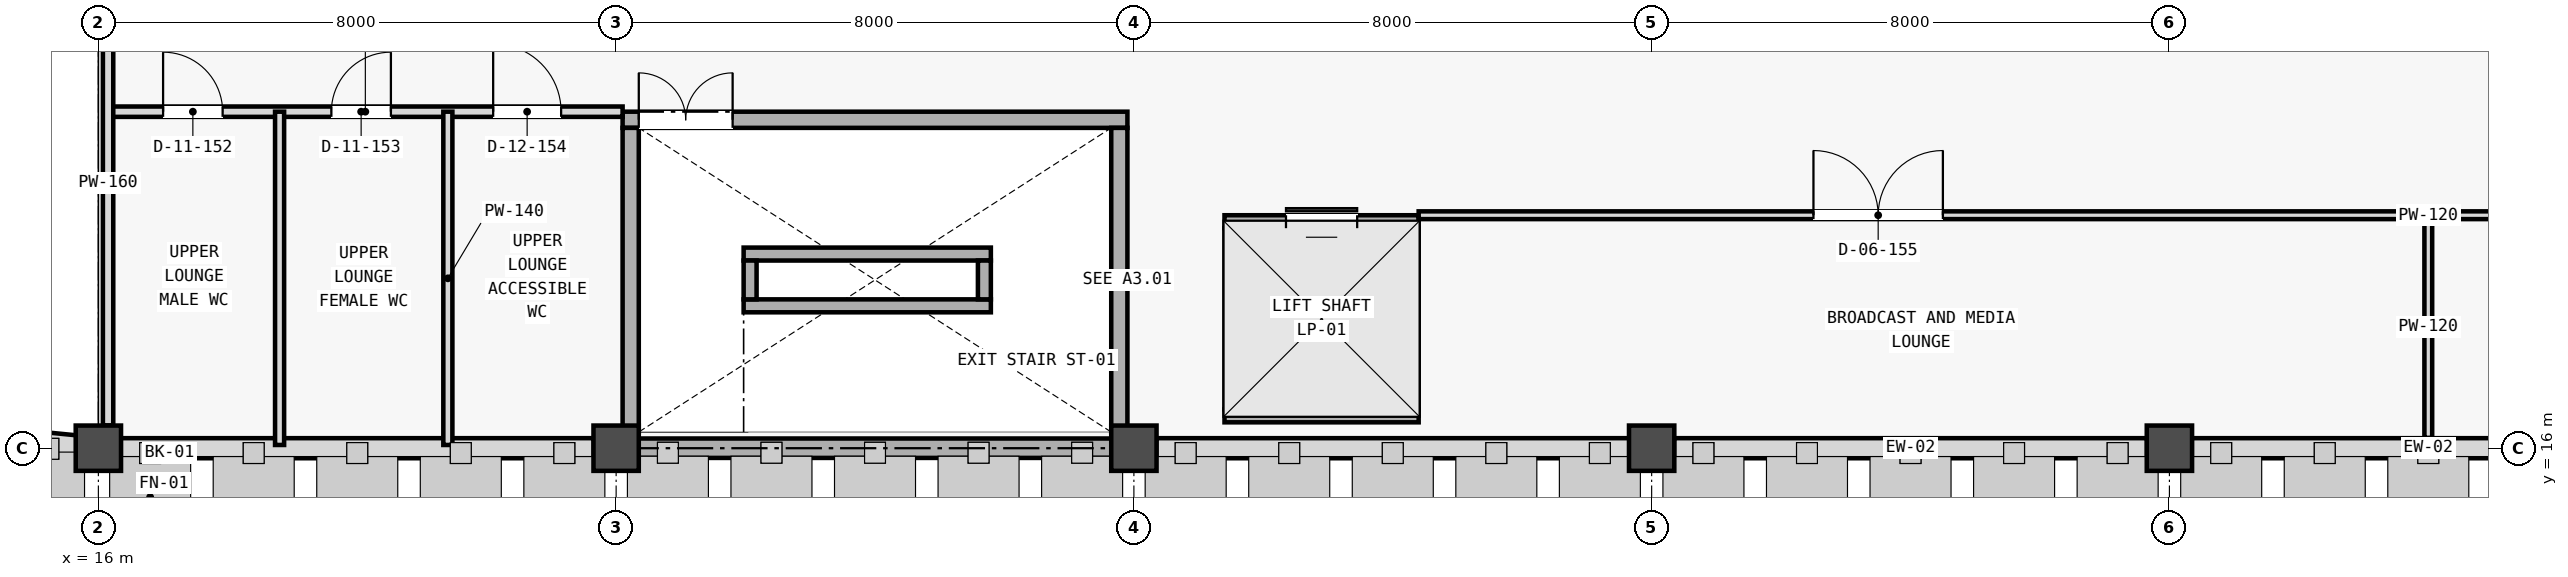
"""IFC4 building model, lengths in metres.
Left out: names, types, materials, properties, quantities, classifications, styles, units other than length and angle.
Written with IfcOpenShell. Run it as: python <this file> out.ifc"""

import sys

from ifc_helpers import new_model, si_unit, direction, frame, frame_2d, origin, origin_2d, place, context, subcontext, project, spatial, rectangle, extrude, element, fill, save


model = new_model("IFC4")
c1 = context("Model", 3, precision=1e-05, world=origin(), true_north=direction((0.0, 1.0)))
c2 = subcontext(c1, "Body", "Model", "MODEL_VIEW")
j1 = project(units=[si_unit("LENGTHUNIT", "METRE"), si_unit("PLANEANGLEUNIT", "RADIAN")], contexts=[c1])
p1 = place(None, origin())
s1 = spatial("IfcSite", under=j1, at=p1, CompositionType="ELEMENT")
p2 = place(p1, origin())
s2 = spatial("IfcBuilding", under=s1, at=p2, CompositionType="ELEMENT")
p3 = place(p2, frame((0.0, 0.0, 10.2)))
s3 = spatial("IfcBuildingStorey", under=s2, at=p3, CompositionType="ELEMENT", Elevation=10.2)
p4 = place(p3, frame((16.0, 16.0, 0.0), z_axis=(0.0, 0.0, 1.0), x_axis=(1.0, 0.0, 0.0)))
e1 = element("IfcColumn", 1, at=p4, inside=s3, PredefinedType="COLUMN", context=c2, shape_type="SweptSolid", body=[
    extrude(rectangle(XDim=0.7, YDim=0.7, at=origin_2d()), origin(), (0.0, 0.0, 1.0), 6.625),
])
p5 = place(p3, frame((24.0, 16.0, 0.0), z_axis=(0.0, 0.0, 1.0), x_axis=(1.0, 0.0, 0.0)))
e2 = element("IfcColumn", 2, at=p5, inside=s3, PredefinedType="COLUMN", context=c2, shape_type="SweptSolid", body=[
    extrude(rectangle(XDim=0.7, YDim=0.7, at=origin_2d()), origin(), (0.0, 0.0, 1.0), 7.325),
])
p6 = place(p3, frame((32.0, 16.0, 0.0), z_axis=(0.0, 0.0, 1.0), x_axis=(1.0, 0.0, 0.0)))
e3 = element("IfcColumn", 3, at=p6, inside=s3, PredefinedType="COLUMN", context=c2, shape_type="SweptSolid", body=[
    extrude(rectangle(XDim=0.7, YDim=0.7, at=origin_2d()), origin(), (0.0, 0.0, 1.0), 7.825),
])
p7 = place(p3, frame((40.0, 16.0, 0.0), z_axis=(0.0, 0.0, 1.0), x_axis=(1.0, 0.0, 0.0)))
e4 = element("IfcColumn", 4, at=p7, inside=s3, PredefinedType="COLUMN", context=c2, shape_type="SweptSolid", body=[
    extrude(rectangle(XDim=0.7, YDim=0.7, at=origin_2d()), origin(), (0.0, 0.0, 1.0), 8.125),
])
p8 = place(p3, frame((48.0, 16.0, 0.0), z_axis=(0.0, 0.0, 1.0), x_axis=(1.0, 0.0, 0.0)))
e5 = element("IfcColumn", 5, at=p8, inside=s3, PredefinedType="COLUMN", context=c2, shape_type="SweptSolid", body=[
    extrude(rectangle(XDim=0.7, YDim=0.7, at=origin_2d()), origin(), (0.0, 0.0, 1.0), 8.225),
])
p9 = place(p3, frame((16.346, 16.0, 0.0), z_axis=(0.0, 0.0, 1.0), x_axis=(1.0, 0.0, 0.0)))
e6 = element("IfcWall", 6, at=p9, inside=s3, PredefinedType="STANDARD", context=c2, shape_type="SweptSolid", body=[
    extrude(rectangle(XDim=7.308, YDim=0.31, at=frame_2d((3.654, 0.0))), origin(), (0.0, 0.0, 1.0), 3.39),
])
p10 = place(p3, frame((24.346, 16.0, 0.0), z_axis=(0.0, 0.0, 1.0), x_axis=(1.0, 0.0, 0.0)))
e7 = element("IfcWall", 7, at=p10, inside=s3, PredefinedType="SHEAR", context=c2, shape_type="SweptSolid", body=[
    extrude(rectangle(XDim=7.308, YDim=0.3, at=frame_2d((3.654, 0.0))), origin(), (0.0, 0.0, 1.0), 4.2),
])
for number, where, z_axis, x_axis in (
    (8, (32.346, 16.0, 0.0), (0.0, 0.0, 1.0), (1.0, 0.0, 0.0)),
    (9, (40.346, 16.0, 0.0), (0.0, 0.0, 1.0), (1.0, 0.0, 0.0)),
    (10, (48.346, 16.0, 0.0), (0.0, 0.0, 1.0), (1.0, 0.0, 0.0)),
):
    element("IfcWall", number, at=place(p3, frame(where, z_axis=z_axis, x_axis=x_axis)), inside=s3, PredefinedType="STANDARD", context=c2, shape_type="SweptSolid", body=[
        extrude(rectangle(XDim=7.308, YDim=0.31, at=frame_2d((3.654, 0.0))), origin(), (0.0, 0.0, 1.0), 3.39),
    ])
p11 = place(p3, frame((12.879, 16.307, 0.0), z_axis=(0.0, 0.0, 1.0), x_axis=(0.995186340733, -0.098000751113, 0.0)))
e11 = element("IfcWall", 11, at=p11, inside=s3, PredefinedType="STANDARD", context=c2, shape_type="SweptSolid", body=[
    extrude(rectangle(XDim=3.136, YDim=0.33, at=frame_2d((1.568, 0.0))), origin(), (0.0, 0.0, 1.0), 3.63),
])
p12 = place(p11, frame((0.968, 0.0, 1.05)))
e12 = element("IfcOpeningElement", 12, at=p12, cuts=e11, PredefinedType="OPENING", context=c2, shape_type="SweptSolid", body=[
    extrude(rectangle(XDim=1.2, YDim=2.05, at=frame_2d((0.6, 1.025))), frame((0.0, 0.175, 0.0), z_axis=(0.0, -1.0, 0.0), x_axis=(1.0, 0.0, 0.0)), (0.0, 0.0, 1.0), 0.35),
])
p13 = place(p3, frame((24.1, 21.075, 0.0), z_axis=(0.0, 0.0, 1.0), x_axis=(1.0, 0.0, 0.0)))
e13 = element("IfcWall", 13, at=p13, inside=s3, PredefinedType="SHEAR", context=c2, shape_type="SweptSolid", body=[
    extrude(rectangle(XDim=7.8, YDim=0.25, at=frame_2d((3.9, 0.0))), origin(), (0.0, 0.0, 1.0), 3.96),
])
p14 = place(p13, frame((0.25, 0.0, 0.0)))
e14 = element("IfcOpeningElement", 14, at=p14, cuts=e13, PredefinedType="OPENING", context=c2, shape_type="SweptSolid", body=[
    extrude(rectangle(XDim=1.45, YDim=2.2, at=frame_2d((0.725, 1.1))), frame((0.0, 0.135, 0.0), z_axis=(0.0, -1.0, 0.0), x_axis=(1.0, 0.0, 0.0)), (0.0, 0.0, 1.0), 0.27),
])
for number, where, z_axis, x_axis in (
    (15, (24.225, 16.25, 0.0), (0.0, 0.0, 1.0), (0.0, 1.0, 0.0)),
    (16, (31.775, 16.25, 0.0), (0.0, 0.0, 1.0), (0.0, 1.0, 0.0)),
):
    element("IfcWall", number, at=place(p3, frame(where, z_axis=z_axis, x_axis=x_axis)), inside=s3, PredefinedType="SHEAR", context=c2, shape_type="SweptSolid", body=[
        extrude(rectangle(XDim=4.7, YDim=0.25, at=frame_2d((2.35, 0.0))), origin(), (0.0, 0.0, 1.0), 3.96),
    ])
for number, where, z_axis, x_axis in (
    (17, (25.97, 18.2, 0.0), (0.0, 0.0, 1.0), (1.0, 0.0, 0.0)),
    (18, (25.97, 19.0, 0.0), (0.0, 0.0, 1.0), (1.0, 0.0, 0.0)),
):
    element("IfcWall", number, at=place(p3, frame(where, z_axis=z_axis, x_axis=x_axis)), inside=s3, PredefinedType="SHEAR", context=c2, shape_type="SweptSolid", body=[
        extrude(rectangle(XDim=3.82, YDim=0.2, at=frame_2d((1.91, 0.0))), origin(), (0.0, 0.0, 1.0), 3.96),
    ])
for number, where, z_axis, x_axis in (
    (19, (26.07, 18.3, 0.0), (0.0, 0.0, 1.0), (0.0, 1.0, 0.0)),
    (20, (29.69, 18.3, 0.0), (0.0, 0.0, 1.0), (0.0, 1.0, 0.0)),
):
    element("IfcWall", number, at=place(p3, frame(where, z_axis=z_axis, x_axis=x_axis)), inside=s3, PredefinedType="SHEAR", context=c2, shape_type="SweptSolid", body=[
        extrude(rectangle(XDim=0.6, YDim=0.2, at=frame_2d((0.3, 0.0))), origin(), (0.0, 0.0, 1.0), 3.96),
    ])
p15 = place(p3, frame((33.4, 16.5, 0.0), z_axis=(0.0, 0.0, 1.0), x_axis=(1.0, 0.0, 0.0)))
e21 = element("IfcWall", 21, at=p15, inside=s3, PredefinedType="SHEAR", context=c2, shape_type="SweptSolid", body=[
    extrude(rectangle(XDim=3.0, YDim=0.2, at=frame_2d((1.5, 0.0))), origin(), (0.0, 0.0, 1.0), 3.96),
])
p16 = place(p3, frame((33.4, 19.5, 0.0), z_axis=(0.0, 0.0, 1.0), x_axis=(1.0, 0.0, 0.0)))
e22 = element("IfcWall", 22, at=p16, inside=s3, PredefinedType="SHEAR", context=c2, shape_type="SweptSolid", body=[
    extrude(rectangle(XDim=3.0, YDim=0.2, at=frame_2d((1.5, 0.0))), origin(), (0.0, 0.0, 1.0), 3.96),
])
p17 = place(p16, frame((0.95, 0.0, 0.0)))
e23 = element("IfcOpeningElement", 23, at=p17, cuts=e22, PredefinedType="OPENING", context=c2, shape_type="SweptSolid", body=[
    extrude(rectangle(XDim=1.1, YDim=2.2, at=frame_2d((0.55, 1.1))), frame((0.0, 0.11, 0.0), z_axis=(0.0, -1.0, 0.0), x_axis=(1.0, 0.0, 0.0)), (0.0, 0.0, 1.0), 0.22),
])
for number, where, z_axis, x_axis in (
    (24, (33.5, 16.6, 0.0), (0.0, 0.0, 1.0), (0.0, 1.0, 0.0)),
    (25, (36.3, 16.6, 0.0), (0.0, 0.0, 1.0), (0.0, 1.0, 0.0)),
):
    element("IfcWall", number, at=place(p3, frame(where, z_axis=z_axis, x_axis=x_axis)), inside=s3, PredefinedType="SHEAR", context=c2, shape_type="SweptSolid", body=[
        extrude(rectangle(XDim=2.8, YDim=0.2, at=frame_2d((1.4, 0.0))), origin(), (0.0, 0.0, 1.0), 3.96),
    ])
p18 = place(p3, frame((16.15, 21.2, 0.0), z_axis=(0.0, 0.0, 1.0), x_axis=(1.0, 0.0, 0.0)))
e26 = element("IfcWall", 26, at=p18, inside=s3, PredefinedType="PARTITIONING", context=c2, shape_type="SweptSolid", body=[
    extrude(rectangle(XDim=7.95, YDim=0.16, at=frame_2d((3.975, 0.0))), origin(), (0.0, 0.0, 1.0), 3.945),
])
p19 = place(p18, frame((0.85, 0.0, 0.0)))
e27 = element("IfcOpeningElement", 27, at=p19, cuts=e26, PredefinedType="OPENING", context=c2, shape_type="SweptSolid", body=[
    extrude(rectangle(XDim=0.92, YDim=2.1, at=frame_2d((0.46, 1.05))), frame((0.0, 0.09, 0.0), z_axis=(0.0, -1.0, 0.0), x_axis=(1.0, 0.0, 0.0)), (0.0, 0.0, 1.0), 0.18),
])
p20 = place(p18, frame((3.45, 0.0, 0.0)))
e28 = element("IfcOpeningElement", 28, at=p20, cuts=e26, PredefinedType="OPENING", context=c2, shape_type="SweptSolid", body=[
    extrude(rectangle(XDim=0.92, YDim=2.1, at=frame_2d((0.46, 1.05))), frame((0.0, 0.09, 0.0), z_axis=(0.0, -1.0, 0.0), x_axis=(1.0, 0.0, 0.0)), (0.0, 0.0, 1.0), 0.18),
])
p21 = place(p18, frame((5.95, 0.0, 0.0)))
e29 = element("IfcOpeningElement", 29, at=p21, cuts=e26, PredefinedType="OPENING", context=c2, shape_type="SweptSolid", body=[
    extrude(rectangle(XDim=1.05, YDim=2.15, at=frame_2d((0.525, 1.075))), frame((0.0, 0.09, 0.0), z_axis=(0.0, -1.0, 0.0), x_axis=(1.0, 0.0, 0.0)), (0.0, 0.0, 1.0), 0.18),
])
p22 = place(p3, frame((16.15, 16.352, 0.0), z_axis=(0.0, 0.0, 1.0), x_axis=(0.0, 1.0, 0.0)))
e30 = element("IfcWall", 30, at=p22, inside=s3, PredefinedType="PARTITIONING", context=c2, shape_type="SweptSolid", body=[
    extrude(rectangle(XDim=7.498, YDim=0.16, at=frame_2d((3.749, 0.0))), origin(), (0.0, 0.0, 1.0), 3.945),
])
for number, where, z_axis, x_axis in (
    (31, (18.8, 16.05, 0.0), (0.0, 0.0, 1.0), (0.0, 1.0, 0.0)),
    (32, (21.4, 16.05, 0.0), (0.0, 0.0, 1.0), (0.0, 1.0, 0.0)),
):
    element("IfcWall", number, at=place(p3, frame(where, z_axis=z_axis, x_axis=x_axis)), inside=s3, PredefinedType="PLUMBINGWALL", context=c2, shape_type="SweptSolid", body=[
        extrude(rectangle(XDim=5.15, YDim=0.14, at=frame_2d((2.575, 0.0))), origin(), (0.0, 0.0, 1.0), 3.39),
    ])
p23 = place(p3, frame((36.4, 19.6, 0.0), z_axis=(0.0, 0.0, 1.0), x_axis=(1.0, 0.0, 0.0)))
e33 = element("IfcWall", 33, at=p23, inside=s3, PredefinedType="PARTITIONING", context=c2, shape_type="SweptSolid", body=[
    extrude(rectangle(XDim=31.2, YDim=0.12, at=frame_2d((15.6, 0.0))), origin(), (0.0, 0.0, 1.0), 3.945),
])
p24 = place(p23, frame((6.1, 0.0, 0.0)))
e34 = element("IfcOpeningElement", 34, at=p24, cuts=e33, PredefinedType="OPENING", context=c2, shape_type="SweptSolid", body=[
    extrude(rectangle(XDim=2.0, YDim=2.4, at=frame_2d((1.0, 1.2))), frame((0.0, 0.07, 0.0), z_axis=(0.0, -1.0, 0.0), x_axis=(1.0, 0.0, 0.0)), (0.0, 0.0, 1.0), 0.14),
])
p25 = place(p23, frame((22.1, 0.0, 0.0)))
e35 = element("IfcOpeningElement", 35, at=p25, cuts=e33, PredefinedType="OPENING", context=c2, shape_type="SweptSolid", body=[
    extrude(rectangle(XDim=2.0, YDim=2.4, at=frame_2d((1.0, 1.2))), frame((0.0, 0.07, 0.0), z_axis=(0.0, -1.0, 0.0), x_axis=(1.0, 0.0, 0.0)), (0.0, 0.0, 1.0), 0.14),
])
p26 = place(p3, frame((52.0, 16.16, 0.0), z_axis=(0.0, 0.0, 1.0), x_axis=(0.0, 1.0, 0.0)))
e36 = element("IfcWall", 36, at=p26, inside=s3, PredefinedType="PARTITIONING", context=c2, shape_type="SweptSolid", body=[
    extrude(rectangle(XDim=3.44, YDim=0.12, at=frame_2d((1.72, 0.0))), origin(), (0.0, 0.0, 1.0), 3.39),
])
p27 = place(p14, origin())
e37 = element("IfcDoor", 37, at=p27, inside=s3, OperationType="DOUBLE_DOOR_SINGLE_SWING", PredefinedType="DOOR", context=c2, shape_type="SweptSolid", body=[
    extrude(rectangle(XDim=1.45, YDim=2.2, at=frame_2d((0.725, 1.1))), frame((0.0, 0.025, 0.0), z_axis=(0.0, -1.0, 0.0), x_axis=(1.0, 0.0, 0.0)), (0.0, 0.0, 1.0), 0.05),
])
fill(e14, e37)
p28 = place(p17, origin())
e38 = element("IfcDoor", 38, at=p28, inside=s3, OperationType="SLIDING_TO_LEFT", PredefinedType="DOOR", context=c2, shape_type="SweptSolid", body=[
    extrude(rectangle(XDim=1.1, YDim=2.2, at=frame_2d((0.55, 1.1))), frame((0.0, 0.025, 0.0), z_axis=(0.0, -1.0, 0.0), x_axis=(1.0, 0.0, 0.0)), (0.0, 0.0, 1.0), 0.05),
])
fill(e23, e38)
p29 = place(p19, origin())
e39 = element("IfcDoor", 39, at=p29, inside=s3, OperationType="SINGLE_SWING_LEFT", PredefinedType="DOOR", context=c2, shape_type="SweptSolid", body=[
    extrude(rectangle(XDim=0.92, YDim=2.1, at=frame_2d((0.46, 1.05))), frame((0.0, 0.025, 0.0), z_axis=(0.0, -1.0, 0.0), x_axis=(1.0, 0.0, 0.0)), (0.0, 0.0, 1.0), 0.05),
])
fill(e27, e39)
p30 = place(p20, origin())
e40 = element("IfcDoor", 40, at=p30, inside=s3, OperationType="SINGLE_SWING_RIGHT", PredefinedType="DOOR", context=c2, shape_type="SweptSolid", body=[
    extrude(rectangle(XDim=0.92, YDim=2.1, at=frame_2d((0.46, 1.05))), frame((0.0, 0.025, 0.0), z_axis=(0.0, -1.0, 0.0), x_axis=(1.0, 0.0, 0.0)), (0.0, 0.0, 1.0), 0.05),
])
fill(e28, e40)
p31 = place(p21, origin())
e41 = element("IfcDoor", 41, at=p31, inside=s3, OperationType="SINGLE_SWING_LEFT", PredefinedType="DOOR", context=c2, shape_type="SweptSolid", body=[
    extrude(rectangle(XDim=1.05, YDim=2.15, at=frame_2d((0.525, 1.075))), frame((0.0, 0.025, 0.0), z_axis=(0.0, -1.0, 0.0), x_axis=(1.0, 0.0, 0.0)), (0.0, 0.0, 1.0), 0.05),
])
fill(e29, e41)
p32 = place(p24, origin())
e42 = element("IfcDoor", 42, at=p32, inside=s3, OperationType="DOUBLE_DOOR_SINGLE_SWING", PredefinedType="DOOR", context=c2, shape_type="SweptSolid", body=[
    extrude(rectangle(XDim=2.0, YDim=2.4, at=frame_2d((1.0, 1.2))), frame((0.0, 0.025, 0.0), z_axis=(0.0, -1.0, 0.0), x_axis=(1.0, 0.0, 0.0)), (0.0, 0.0, 1.0), 0.05),
])
fill(e34, e42)
save(model, sys.argv[1])
